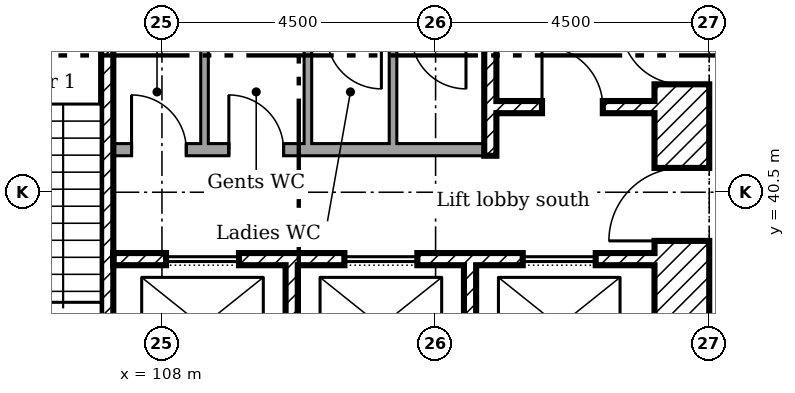
"""IFC4 building model, lengths in metres.
Left out: names, types, materials, properties, quantities, classifications, styles, units other than length and angle.
Written with IfcOpenShell. Run it as: python <this file> out.ifc"""

import sys

from ifc_helpers import new_model, si_unit, direction, frame, frame_2d, origin, place, context, subcontext, project, spatial, rectangle, extrude, element, fill, save


model = new_model("IFC4")
c1 = context("Model", 3, precision=1e-05, world=origin(), true_north=direction((0.0, 1.0)))
c2 = subcontext(c1, "Body", "Model", "MODEL_VIEW")
j1 = project(units=[si_unit("LENGTHUNIT", "METRE"), si_unit("PLANEANGLEUNIT", "RADIAN")], contexts=[c1])
p1 = place(None, origin())
s1 = spatial("IfcSite", under=j1, at=p1, CompositionType="ELEMENT")
p2 = place(p1, origin())
s2 = spatial("IfcBuilding", under=s1, at=p2, CompositionType="ELEMENT")
p3 = place(p2, frame((0.0, 0.0, 34.2)))
s3 = spatial("IfcBuildingStorey", under=s2, at=p3, CompositionType="ELEMENT", Elevation=34.2)
p4 = place(p3, frame((116.55, 36.0, 0.0), z_axis=(0.0, 0.0, 1.0), x_axis=(0.0, 1.0, 0.0)))
e1 = element("IfcWall", 1, at=p4, inside=s3, PredefinedType="SHEAR", context=c2, shape_type="SweptSolid", body=[
    extrude(rectangle(XDim=13.5, YDim=0.9, at=frame_2d((6.75, 0.0))), origin(), (0.0, 0.0, 1.0), 4.125),
])
p5 = place(p4, frame((3.7, 0.0, 0.0)))
e2 = element("IfcOpeningElement", 2, at=p5, cuts=e1, PredefinedType="OPENING", context=c2, shape_type="SweptSolid", body=[
    extrude(rectangle(XDim=1.2, YDim=2.1, at=frame_2d((0.6, 1.05))), frame((0.0, 0.46, 0.0), z_axis=(0.0, -1.0, 0.0), x_axis=(1.0, 0.0, 0.0)), (0.0, 0.0, 1.0), 0.92),
])
p6 = place(p4, frame((6.275, 0.0, 0.0)))
e3 = element("IfcOpeningElement", 3, at=p6, cuts=e1, PredefinedType="OPENING", context=c2, shape_type="SweptSolid", body=[
    extrude(rectangle(XDim=1.0, YDim=2.1, at=frame_2d((0.5, 1.05))), frame((0.0, 0.46, 0.0), z_axis=(0.0, -1.0, 0.0), x_axis=(1.0, 0.0, 0.0)), (0.0, 0.0, 1.0), 0.92),
])
for number, where, z_axis, x_axis in (
    (4, (110.133, 36.9, 0.0), (0.0, 0.0, 1.0), (0.0, 1.0, 0.0)),
    (5, (113.067, 36.9, 0.0), (0.0, 0.0, 1.0), (0.0, 1.0, 0.0)),
):
    element("IfcWall", number, at=place(p3, frame(where, z_axis=z_axis, x_axis=x_axis)), inside=s3, PredefinedType="SHEAR", context=c2, shape_type="SweptSolid", body=[
        extrude(rectangle(XDim=2.4, YDim=0.2, at=frame_2d((1.2, 0.0))), origin(), (0.0, 0.0, 1.0), 4.125),
    ])
p7 = place(p3, frame((107.2, 39.4, 0.0)))
e6 = element("IfcWall", 6, at=p7, inside=s3, PredefinedType="SHEAR", context=c2, shape_type="SweptSolid", body=[
    extrude(rectangle(XDim=8.9, YDim=0.2, at=frame_2d((4.45, 0.0))), origin(), (0.0, 0.0, 1.0), 4.125),
])
p8 = place(p7, frame((0.867, 0.0, 0.0)))
e7 = element("IfcOpeningElement", 7, at=p8, cuts=e6, PredefinedType="OPENING", context=c2, shape_type="SweptSolid", body=[
    extrude(rectangle(XDim=1.2, YDim=2.1, at=frame_2d((0.6, 1.05))), frame((0.0, 0.11, 0.0), z_axis=(0.0, -1.0, 0.0), x_axis=(1.0, 0.0, 0.0)), (0.0, 0.0, 1.0), 0.22),
])
p9 = place(p7, frame((3.8, 0.0, 0.0)))
e8 = element("IfcOpeningElement", 8, at=p9, cuts=e6, PredefinedType="OPENING", context=c2, shape_type="SweptSolid", body=[
    extrude(rectangle(XDim=1.2, YDim=2.1, at=frame_2d((0.6, 1.05))), frame((0.0, 0.11, 0.0), z_axis=(0.0, -1.0, 0.0), x_axis=(1.0, 0.0, 0.0)), (0.0, 0.0, 1.0), 0.22),
])
p10 = place(p7, frame((6.733, 0.0, 0.0)))
e9 = element("IfcOpeningElement", 9, at=p10, cuts=e6, PredefinedType="OPENING", context=c2, shape_type="SweptSolid", body=[
    extrude(rectangle(XDim=1.2, YDim=2.1, at=frame_2d((0.6, 1.05))), frame((0.0, 0.11, 0.0), z_axis=(0.0, -1.0, 0.0), x_axis=(1.0, 0.0, 0.0)), (0.0, 0.0, 1.0), 0.22),
])
p11 = place(p3, frame((107.1, 36.9, 0.0), z_axis=(0.0, 0.0, 1.0), x_axis=(0.0, 1.0, 0.0)))
e10 = element("IfcWall", 10, at=p11, inside=s3, PredefinedType="SHEAR", context=c2, shape_type="SweptSolid", body=[
    extrude(rectangle(XDim=6.8, YDim=0.2, at=frame_2d((3.4, 0.0))), origin(), (0.0, 0.0, 1.0), 4.125),
])
p12 = place(p3, frame((113.5, 41.9, 0.0)))
e11 = element("IfcWall", 11, at=p12, inside=s3, PredefinedType="SHEAR", context=c2, shape_type="SweptSolid", body=[
    extrude(rectangle(XDim=2.6, YDim=0.2, at=frame_2d((1.3, 0.0))), origin(), (0.0, 0.0, 1.0), 4.125),
])
p13 = place(p12, frame((0.75, 0.0, 0.0)))
e12 = element("IfcOpeningElement", 12, at=p13, cuts=e11, PredefinedType="OPENING", context=c2, shape_type="SweptSolid", body=[
    extrude(rectangle(XDim=1.0, YDim=2.1, at=frame_2d((0.5, 1.05))), frame((0.0, 0.11, 0.0), z_axis=(0.0, -1.0, 0.0), x_axis=(1.0, 0.0, 0.0)), (0.0, 0.0, 1.0), 0.22),
])
p14 = place(p3, frame((113.4, 41.1, 0.0), z_axis=(0.0, 0.0, 1.0), x_axis=(0.0, 1.0, 0.0)))
e13 = element("IfcWall", 13, at=p14, inside=s3, PredefinedType="SHEAR", context=c2, shape_type="SweptSolid", body=[
    extrude(rectangle(XDim=7.5, YDim=0.2, at=frame_2d((3.75, 0.0))), origin(), (0.0, 0.0, 1.0), 4.125),
])
p15 = place(p3, frame((107.2, 41.2, 0.0)))
e14 = element("IfcWall", 14, at=p15, inside=s3, PredefinedType="PARTITIONING", context=c2, shape_type="SweptSolid", body=[
    extrude(rectangle(XDim=6.1, YDim=0.2, at=frame_2d((3.05, 0.0))), origin(), (0.0, 0.0, 1.0), 4.125),
])
p16 = place(p15, frame((0.3, 0.0, 0.0)))
e15 = element("IfcOpeningElement", 15, at=p16, cuts=e14, PredefinedType="OPENING", context=c2, shape_type="SweptSolid", body=[
    extrude(rectangle(XDim=0.9, YDim=2.1, at=frame_2d((0.45, 1.05))), frame((0.0, 0.11, 0.0), z_axis=(0.0, -1.0, 0.0), x_axis=(1.0, 0.0, 0.0)), (0.0, 0.0, 1.0), 0.22),
])
p17 = place(p15, frame((1.9, 0.0, 0.0)))
e16 = element("IfcOpeningElement", 16, at=p17, cuts=e14, PredefinedType="OPENING", context=c2, shape_type="SweptSolid", body=[
    extrude(rectangle(XDim=0.9, YDim=2.1, at=frame_2d((0.45, 1.05))), frame((0.0, 0.11, 0.0), z_axis=(0.0, -1.0, 0.0), x_axis=(1.0, 0.0, 0.0)), (0.0, 0.0, 1.0), 0.22),
])
for number, where, z_axis, x_axis in (
    (17, (108.7, 41.3, 0.0), (0.0, 0.0, 1.0), (0.0, 1.0, 0.0)),
    (18, (110.4, 41.3, 0.0), (0.0, 0.0, 1.0), (0.0, 1.0, 0.0)),
    (19, (111.8, 41.3, 0.0), (0.0, 0.0, 1.0), (0.0, 1.0, 0.0)),
):
    element("IfcWall", number, at=place(p3, frame(where, z_axis=z_axis, x_axis=x_axis)), inside=s3, PredefinedType="PARTITIONING", context=c2, shape_type="SweptSolid", body=[
        extrude(rectangle(XDim=1.7, YDim=0.125, at=frame_2d((0.85, 0.0))), origin(), (0.0, 0.0, 1.0), 4.125),
    ])
p18 = place(p5, origin())
e20 = element("IfcDoor", 20, at=p18, inside=s3, OperationType="SINGLE_SWING_RIGHT", PredefinedType="DOOR", context=c2, shape_type="SweptSolid", body=[
    extrude(rectangle(XDim=1.2, YDim=2.1, at=frame_2d((0.6, 1.05))), frame((0.0, 0.025, 0.0), z_axis=(0.0, -1.0, 0.0), x_axis=(1.0, 0.0, 0.0)), (0.0, 0.0, 1.0), 0.05),
])
fill(e2, e20)
p19 = place(p13, origin())
e21 = element("IfcDoor", 21, at=p19, inside=s3, OperationType="SINGLE_SWING_RIGHT", PredefinedType="DOOR", context=c2, shape_type="SweptSolid", body=[
    extrude(rectangle(XDim=1.0, YDim=2.1, at=frame_2d((0.5, 1.05))), frame((0.0, 0.025, 0.0), z_axis=(0.0, -1.0, 0.0), x_axis=(1.0, 0.0, 0.0)), (0.0, 0.0, 1.0), 0.05),
])
fill(e12, e21)
p20 = place(p6, origin())
e22 = element("IfcDoor", 22, at=p20, inside=s3, OperationType="SINGLE_SWING_LEFT", PredefinedType="DOOR", context=c2, shape_type="SweptSolid", body=[
    extrude(rectangle(XDim=1.0, YDim=2.1, at=frame_2d((0.5, 1.05))), frame((0.0, 0.025, 0.0), z_axis=(0.0, -1.0, 0.0), x_axis=(1.0, 0.0, 0.0)), (0.0, 0.0, 1.0), 0.05),
])
fill(e3, e22)
p21 = place(p16, origin())
e23 = element("IfcDoor", 23, at=p21, inside=s3, OperationType="SINGLE_SWING_RIGHT", PredefinedType="DOOR", context=c2, shape_type="SweptSolid", body=[
    extrude(rectangle(XDim=0.9, YDim=2.1, at=frame_2d((0.45, 1.05))), frame((0.0, 0.025, 0.0), z_axis=(0.0, -1.0, 0.0), x_axis=(1.0, 0.0, 0.0)), (0.0, 0.0, 1.0), 0.05),
])
fill(e15, e23)
p22 = place(p17, origin())
e24 = element("IfcDoor", 24, at=p22, inside=s3, OperationType="SINGLE_SWING_RIGHT", PredefinedType="DOOR", context=c2, shape_type="SweptSolid", body=[
    extrude(rectangle(XDim=0.9, YDim=2.1, at=frame_2d((0.45, 1.05))), frame((0.0, 0.025, 0.0), z_axis=(0.0, -1.0, 0.0), x_axis=(1.0, 0.0, 0.0)), (0.0, 0.0, 1.0), 0.05),
])
fill(e16, e24)
p23 = place(p8, origin())
e25 = element("IfcDoor", 25, at=p23, inside=s3, OperationType="SLIDING_TO_LEFT", PredefinedType="DOOR", context=c2, shape_type="SweptSolid", body=[
    extrude(rectangle(XDim=1.2, YDim=2.1, at=frame_2d((0.6, 1.05))), frame((0.0, 0.025, 0.0), z_axis=(0.0, -1.0, 0.0), x_axis=(1.0, 0.0, 0.0)), (0.0, 0.0, 1.0), 0.05),
])
fill(e7, e25)
p24 = place(p9, origin())
e26 = element("IfcDoor", 26, at=p24, inside=s3, OperationType="SLIDING_TO_LEFT", PredefinedType="DOOR", context=c2, shape_type="SweptSolid", body=[
    extrude(rectangle(XDim=1.2, YDim=2.1, at=frame_2d((0.6, 1.05))), frame((0.0, 0.025, 0.0), z_axis=(0.0, -1.0, 0.0), x_axis=(1.0, 0.0, 0.0)), (0.0, 0.0, 1.0), 0.05),
])
fill(e8, e26)
p25 = place(p10, origin())
e27 = element("IfcDoor", 27, at=p25, inside=s3, OperationType="SLIDING_TO_LEFT", PredefinedType="DOOR", context=c2, shape_type="SweptSolid", body=[
    extrude(rectangle(XDim=1.2, YDim=2.1, at=frame_2d((0.6, 1.05))), frame((0.0, 0.025, 0.0), z_axis=(0.0, -1.0, 0.0), x_axis=(1.0, 0.0, 0.0)), (0.0, 0.0, 1.0), 0.05),
])
fill(e9, e27)
save(model, sys.argv[1])
